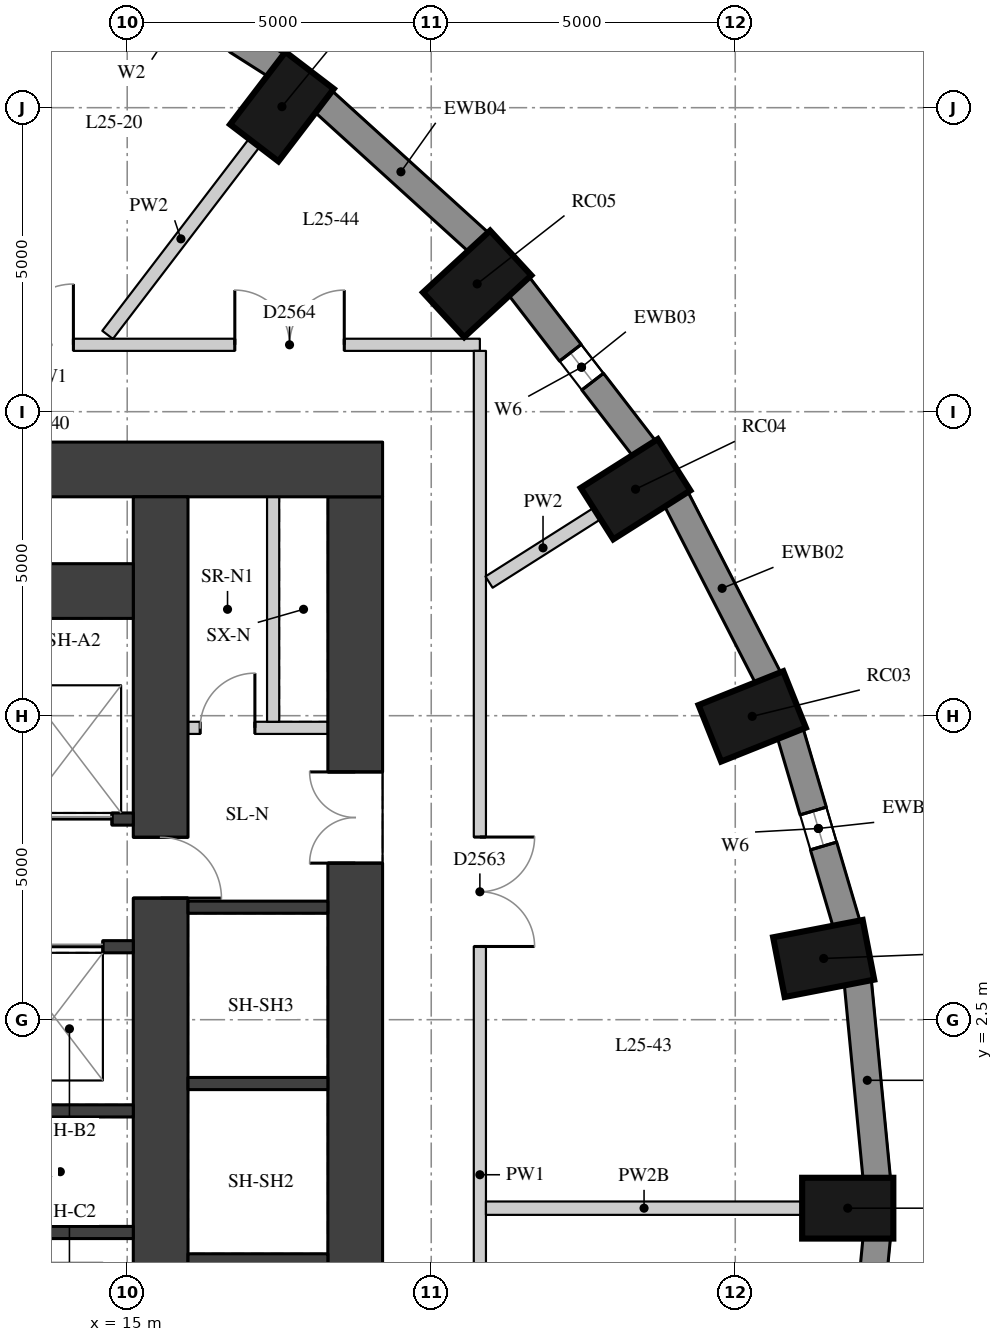
"""IFC4 building model, lengths in metres.
Left out: names, types, materials, properties, quantities, classifications, styles, units other than length and angle.
Written with IfcOpenShell. Run it as: python <this file> out.ifc"""

import sys

from ifc_helpers import new_model, si_unit, direction, frame, frame_2d, origin, origin_2d, place, context, subcontext, project, spatial, rectangle, extrude, element, fill, save


model = new_model("IFC4")
c1 = context("Model", 3, precision=1e-05, world=origin(), true_north=direction((0.0, 1.0)))
c2 = subcontext(c1, "Body", "Model", "MODEL_VIEW")
j1 = project(units=[si_unit("LENGTHUNIT", "METRE"), si_unit("PLANEANGLEUNIT", "RADIAN")], contexts=[c1])
p1 = place(None, origin())
s1 = spatial("IfcSite", under=j1, at=p1, CompositionType="ELEMENT")
p2 = place(p1, origin())
s2 = spatial("IfcBuilding", under=s1, at=p2, CompositionType="ELEMENT")
p3 = place(p2, frame((0.0, 0.0, 92.2)))
s3 = spatial("IfcBuildingStorey", under=s2, at=p3, CompositionType="ELEMENT", Elevation=92.2)
for number, where, z_axis, x_axis in (
    (1, (26.85, -0.6, 0.0), (0.0, 0.0, 1.0), (1.0, 0.0, 0.0)),
    (2, (26.454, 3.507, 0.0), (0.0, 0.0, 1.0), (0.982, 0.19, 0.0)),
    (3, (25.279, 7.489, 0.0), (0.0, 0.0, 1.0), (0.929, 0.371, 0.0)),
    (4, (23.36, 11.225, 0.0), (0.0, 0.0, 1.0), (0.845, 0.536, 0.0)),
    (5, (20.755, 14.602, 0.0), (0.0, 0.0, 1.0), (0.735, 0.678, 0.0)),
    (6, (17.545, 17.517, 0.0), (0.0, 0.0, 1.0), (0.607, 0.795, 0.0)),
):
    element("IfcColumn", number, at=place(p3, frame(where, z_axis=z_axis, x_axis=x_axis)), inside=s3, PredefinedType="COLUMN", context=c2, shape_type="SweptSolid", body=[
        extrude(rectangle(XDim=1.5, YDim=1.0, at=origin_2d()), origin(), (0.0, 0.0, 1.0), 3.3),
    ])
p4 = place(p3, frame((27.328, -0.12, 0.0), z_axis=(0.0, 0.0, 1.0), x_axis=(-0.09589355735, 0.995391594127, 0.0)))
e7 = element("IfcWall", 7, at=p4, inside=s3, PredefinedType="SOLIDWALL", context=c2, shape_type="SweptSolid", body=[
    extrude(rectangle(XDim=3.261, YDim=0.45, at=frame_2d((1.631, 0.0))), origin(), (0.0, 0.0, 1.0), 3.02),
])
p5 = place(p3, frame((26.832, 4.069, 0.0), z_axis=(0.0, 0.0, 1.0), x_axis=(-0.283002902729, 0.959119052593, 0.0)))
e8 = element("IfcWall", 8, at=p5, inside=s3, PredefinedType="SOLIDWALL", context=c2, shape_type="SweptSolid", body=[
    extrude(rectangle(XDim=3.286, YDim=0.45, at=frame_2d((1.643, 0.0))), origin(), (0.0, 0.0, 1.0), 3.02),
])
p6 = place(p5, frame((1.343, 0.0, 0.4)))
e9 = element("IfcOpeningElement", 9, at=p6, cuts=e8, PredefinedType="OPENING", context=c2, shape_type="SweptSolid", body=[
    extrude(rectangle(XDim=0.6, YDim=1.75, at=frame_2d((0.3, 0.875))), frame((0.0, 0.235, 0.0), z_axis=(0.0, -1.0, 0.0), x_axis=(1.0, 0.0, 0.0)), (0.0, 0.0, 1.0), 0.47),
])
p7 = place(p3, frame((25.545, 8.112, 0.0), z_axis=(0.0, 0.0, 1.0), x_axis=(-0.456828186229, 0.889554949549, 0.0)))
e10 = element("IfcWall", 10, at=p7, inside=s3, PredefinedType="SOLIDWALL", context=c2, shape_type="SweptSolid", body=[
    extrude(rectangle(XDim=3.333, YDim=0.45, at=frame_2d((1.667, 0.0))), origin(), (0.0, 0.0, 1.0), 3.02),
])
p8 = place(p3, frame((23.508, 11.887, 0.0), z_axis=(0.0, 0.0, 1.0), x_axis=(-0.610693945156, 0.791866721961, 0.0)))
e11 = element("IfcWall", 11, at=p8, inside=s3, PredefinedType="SOLIDWALL", context=c2, shape_type="SweptSolid", body=[
    extrude(rectangle(XDim=3.395, YDim=0.45, at=frame_2d((1.697, 0.0))), origin(), (0.0, 0.0, 1.0), 3.02),
])
p9 = place(p8, frame((1.397, 0.0, 0.4)))
e12 = element("IfcOpeningElement", 12, at=p9, cuts=e11, PredefinedType="OPENING", context=c2, shape_type="SweptSolid", body=[
    extrude(rectangle(XDim=0.6, YDim=1.75, at=frame_2d((0.3, 0.875))), frame((0.0, 0.235, 0.0), z_axis=(0.0, -1.0, 0.0), x_axis=(1.0, 0.0, 0.0)), (0.0, 0.0, 1.0), 0.47),
])
p10 = place(p3, frame((20.784, 15.281, 0.0), z_axis=(0.0, 0.0, 1.0), x_axis=(-0.74032902847, 0.672244694739, 0.0)))
e13 = element("IfcWall", 13, at=p10, inside=s3, PredefinedType="SOLIDWALL", context=c2, shape_type="SweptSolid", body=[
    extrude(rectangle(XDim=3.464, YDim=0.45, at=frame_2d((1.732, 0.0))), origin(), (0.0, 0.0, 1.0), 3.02),
])
p11 = place(p3, frame((17.456, 18.192, 0.0), z_axis=(0.0, 0.0, 1.0), x_axis=(-0.843880549131, 0.536531097699, 0.0)))
e14 = element("IfcWall", 14, at=p11, inside=s3, PredefinedType="SOLIDWALL", context=c2, shape_type="SweptSolid", body=[
    extrude(rectangle(XDim=3.532, YDim=0.45, at=frame_2d((1.766, 0.0))), origin(), (0.0, 0.0, 1.0), 3.02),
])
p12 = place(p11, frame((0.766, 0.0, 0.4)))
e15 = element("IfcOpeningElement", 15, at=p12, cuts=e14, PredefinedType="OPENING", context=c2, shape_type="SweptSolid", body=[
    extrude(rectangle(XDim=2.0, YDim=1.75, at=frame_2d((1.0, 0.875))), frame((0.0, 0.235, 0.0), z_axis=(0.0, -1.0, 0.0), x_axis=(1.0, 0.0, 0.0)), (0.0, 0.0, 1.0), 0.47),
])
p13 = place(p3, frame((27.015, -4.326, 0.0), z_axis=(0.0, 0.0, 1.0), x_axis=(0.09589355735, 0.995391594127, 0.0)))
e16 = element("IfcWall", 16, at=p13, inside=s3, PredefinedType="SOLIDWALL", context=c2, shape_type="SweptSolid", body=[
    extrude(rectangle(XDim=3.261, YDim=0.45, at=frame_2d((1.631, 0.0))), origin(), (0.0, 0.0, 1.0), 3.02),
])
p14 = place(p13, frame((1.331, 0.0, 0.4)))
e17 = element("IfcOpeningElement", 17, at=p14, cuts=e16, PredefinedType="OPENING", context=c2, shape_type="SweptSolid", body=[
    extrude(rectangle(XDim=0.6, YDim=1.75, at=frame_2d((0.3, 0.875))), frame((0.0, 0.235, 0.0), z_axis=(0.0, -1.0, 0.0), x_axis=(1.0, 0.0, 0.0)), (0.0, 0.0, 1.0), 0.47),
])
p15 = place(p3, frame((18.75, -11.1, 0.0), z_axis=(0.0, 0.0, 1.0), x_axis=(0.0, 1.0, 0.0)))
e18 = element("IfcWall", 18, at=p15, inside=s3, PredefinedType="SHEAR", context=c2, shape_type="SweptSolid", body=[
    extrude(rectangle(XDim=22.2, YDim=0.9, at=frame_2d((11.1, 0.0))), origin(), (0.0, 0.0, 1.0), 3.02),
])
p16 = place(p15, frame((16.175, 0.0, 0.0)))
e19 = element("IfcOpeningElement", 19, at=p16, cuts=e18, PredefinedType="OPENING", context=c2, shape_type="SweptSolid", body=[
    extrude(rectangle(XDim=1.5, YDim=2.1, at=frame_2d((0.75, 1.05))), frame((0.0, 0.46, 0.0), z_axis=(0.0, -1.0, 0.0), x_axis=(1.0, 0.0, 0.0)), (0.0, 0.0, 1.0), 0.92),
])
p17 = place(p15, frame((5.025, 0.0, 0.0)))
e20 = element("IfcOpeningElement", 20, at=p17, cuts=e18, PredefinedType="OPENING", context=c2, shape_type="SweptSolid", body=[
    extrude(rectangle(XDim=1.5, YDim=2.1, at=frame_2d((0.75, 1.05))), frame((0.0, 0.46, 0.0), z_axis=(0.0, -1.0, 0.0), x_axis=(1.0, 0.0, 0.0)), (0.0, 0.0, 1.0), 0.92),
])
p18 = place(p3, frame((4.0, 11.55, 0.0), z_axis=(0.0, 0.0, 1.0), x_axis=(1.0, 0.0, 0.0)))
e21 = element("IfcWall", 21, at=p18, inside=s3, PredefinedType="SHEAR", context=c2, shape_type="SweptSolid", body=[
    extrude(rectangle(XDim=15.2, YDim=0.9, at=frame_2d((7.6, 0.0))), origin(), (0.0, 0.0, 1.0), 3.02),
])
p19 = place(p3, frame((15.55, -11.1, 0.0), z_axis=(0.0, 0.0, 1.0), x_axis=(0.0, 1.0, 0.0)))
e22 = element("IfcWall", 22, at=p19, inside=s3, PredefinedType="SHEAR", context=c2, shape_type="SweptSolid", body=[
    extrude(rectangle(XDim=22.2, YDim=0.9, at=frame_2d((11.1, 0.0))), origin(), (0.0, 0.0, 1.0), 3.02),
])
p20 = place(p19, frame((15.6, 0.0, 0.0)))
e23 = element("IfcOpeningElement", 23, at=p20, cuts=e22, PredefinedType="OPENING", context=c2, shape_type="SweptSolid", body=[
    extrude(rectangle(XDim=1.0, YDim=2.1, at=frame_2d((0.5, 1.05))), frame((0.0, 0.46, 0.0), z_axis=(0.0, -1.0, 0.0), x_axis=(1.0, 0.0, 0.0)), (0.0, 0.0, 1.0), 0.92),
])
p21 = place(p19, frame((5.6, 0.0, 0.0)))
e24 = element("IfcOpeningElement", 24, at=p21, cuts=e22, PredefinedType="OPENING", context=c2, shape_type="SweptSolid", body=[
    extrude(rectangle(XDim=1.0, YDim=2.1, at=frame_2d((0.5, 1.05))), frame((0.0, 0.46, 0.0), z_axis=(0.0, -1.0, 0.0), x_axis=(1.0, 0.0, 0.0)), (0.0, 0.0, 1.0), 0.92),
])
p22 = place(p3, frame((4.9, 9.55, 0.0), z_axis=(0.0, 0.0, 1.0), x_axis=(1.0, 0.0, 0.0)))
e25 = element("IfcWall", 25, at=p22, inside=s3, PredefinedType="SHEAR", context=c2, shape_type="SweptSolid", body=[
    extrude(rectangle(XDim=10.2, YDim=0.9, at=frame_2d((5.1, 0.0))), origin(), (0.0, 0.0, 1.0), 3.02),
])
p23 = place(p3, frame((4.9, 5.8, 0.0), z_axis=(0.0, 0.0, 1.0), x_axis=(1.0, 0.0, 0.0)))
e26 = element("IfcWall", 26, at=p23, inside=s3, PredefinedType="SHEAR", context=c2, shape_type="SweptSolid", body=[
    extrude(rectangle(XDim=10.2, YDim=0.2, at=frame_2d((5.1, 0.0))), origin(), (0.0, 0.0, 1.0), 3.02),
])
p24 = place(p23, frame((6.75, 0.0, 0.0)))
e27 = element("IfcOpeningElement", 27, at=p24, cuts=e26, PredefinedType="OPENING", context=c2, shape_type="SweptSolid", body=[
    extrude(rectangle(XDim=1.1, YDim=2.1, at=frame_2d((0.55, 1.05))), frame((0.0, 0.11, 0.0), z_axis=(0.0, -1.0, 0.0), x_axis=(1.0, 0.0, 0.0)), (0.0, 0.0, 1.0), 0.22),
])
p25 = place(p23, frame((8.75, 0.0, 0.0)))
e28 = element("IfcOpeningElement", 28, at=p25, cuts=e26, PredefinedType="OPENING", context=c2, shape_type="SweptSolid", body=[
    extrude(rectangle(XDim=1.1, YDim=2.1, at=frame_2d((0.55, 1.05))), frame((0.0, 0.11, 0.0), z_axis=(0.0, -1.0, 0.0), x_axis=(1.0, 0.0, 0.0)), (0.0, 0.0, 1.0), 0.22),
])
p26 = place(p3, frame((4.9, 3.7, 0.0), z_axis=(0.0, 0.0, 1.0), x_axis=(1.0, 0.0, 0.0)))
e29 = element("IfcWall", 29, at=p26, inside=s3, PredefinedType="SHEAR", context=c2, shape_type="SweptSolid", body=[
    extrude(rectangle(XDim=10.2, YDim=0.2, at=frame_2d((5.1, 0.0))), origin(), (0.0, 0.0, 1.0), 3.02),
])
p27 = place(p26, frame((6.3, 0.0, 0.0)))
e30 = element("IfcOpeningElement", 30, at=p27, cuts=e29, PredefinedType="OPENING", context=c2, shape_type="SweptSolid", body=[
    extrude(rectangle(XDim=1.1, YDim=2.1, at=frame_2d((0.55, 1.05))), frame((0.0, 0.11, 0.0), z_axis=(0.0, -1.0, 0.0), x_axis=(1.0, 0.0, 0.0)), (0.0, 0.0, 1.0), 0.22),
])
p28 = place(p26, frame((8.6, 0.0, 0.0)))
e31 = element("IfcOpeningElement", 31, at=p28, cuts=e29, PredefinedType="OPENING", context=c2, shape_type="SweptSolid", body=[
    extrude(rectangle(XDim=1.1, YDim=2.1, at=frame_2d((0.55, 1.05))), frame((0.0, 0.11, 0.0), z_axis=(0.0, -1.0, 0.0), x_axis=(1.0, 0.0, 0.0)), (0.0, 0.0, 1.0), 0.22),
])
for number, where, z_axis, x_axis in (
    (32, (4.9, 1.0, 0.0), (0.0, 0.0, 1.0), (1.0, 0.0, 0.0)),
    (33, (4.9, -1.0, 0.0), (0.0, 0.0, 1.0), (1.0, 0.0, 0.0)),
):
    element("IfcWall", number, at=place(p3, frame(where, z_axis=z_axis, x_axis=x_axis)), inside=s3, PredefinedType="SHEAR", context=c2, shape_type="SweptSolid", body=[
        extrude(rectangle(XDim=10.2, YDim=0.2, at=frame_2d((5.1, 0.0))), origin(), (0.0, 0.0, 1.0), 3.02),
    ])
for number, where, z_axis, x_axis in (
    (34, (16.0, -1.45, 0.0), (0.0, 0.0, 1.0), (1.0, 0.0, 0.0)),
    (35, (16.0, 1.45, 0.0), (0.0, 0.0, 1.0), (1.0, 0.0, 0.0)),
    (36, (16.0, 4.35, 0.0), (0.0, 0.0, 1.0), (1.0, 0.0, 0.0)),
):
    element("IfcWall", number, at=place(p3, frame(where, z_axis=z_axis, x_axis=x_axis)), inside=s3, PredefinedType="SHEAR", context=c2, shape_type="SweptSolid", body=[
        extrude(rectangle(XDim=2.3, YDim=0.2, at=frame_2d((1.15, 0.0))), origin(), (0.0, 0.0, 1.0), 3.02),
    ])
p29 = place(p3, frame((16.0, 7.3, 0.0), z_axis=(0.0, 0.0, 1.0), x_axis=(1.0, 0.0, 0.0)))
e37 = element("IfcWall", 37, at=p29, inside=s3, PredefinedType="PARTITIONING", context=c2, shape_type="SweptSolid", body=[
    extrude(rectangle(XDim=2.3, YDim=0.2, at=frame_2d((1.15, 0.0))), origin(), (0.0, 0.0, 1.0), 3.02),
])
p30 = place(p29, frame((0.2, 0.0, 0.0)))
e38 = element("IfcOpeningElement", 38, at=p30, cuts=e37, PredefinedType="OPENING", context=c2, shape_type="SweptSolid", body=[
    extrude(rectangle(XDim=0.9, YDim=2.1, at=frame_2d((0.45, 1.05))), frame((0.0, 0.11, 0.0), z_axis=(0.0, -1.0, 0.0), x_axis=(1.0, 0.0, 0.0)), (0.0, 0.0, 1.0), 0.22),
])
p31 = place(p3, frame((17.4, 7.4, 0.0), z_axis=(0.0, 0.0, 1.0), x_axis=(0.0, 1.0, 0.0)))
e39 = element("IfcWall", 39, at=p31, inside=s3, PredefinedType="PARTITIONING", context=c2, shape_type="SweptSolid", body=[
    extrude(rectangle(XDim=3.7, YDim=0.2, at=frame_2d((1.85, 0.0))), origin(), (0.0, 0.0, 1.0), 3.02),
])
p32 = place(p3, frame((6.589, 13.6, 0.0), z_axis=(0.0, 0.0, 1.0), x_axis=(1.0, 0.0, 0.0)))
e40 = element("IfcWall", 40, at=p32, inside=s3, PredefinedType="PARTITIONING", context=c2, shape_type="SweptSolid", body=[
    extrude(rectangle(XDim=14.211, YDim=0.2, at=frame_2d((7.106, 0.0))), origin(), (0.0, 0.0, 1.0), 3.02),
])
p33 = place(p32, frame((6.527, 0.0, 0.0)))
e41 = element("IfcOpeningElement", 41, at=p33, cuts=e40, PredefinedType="OPENING", context=c2, shape_type="SweptSolid", body=[
    extrude(rectangle(XDim=1.0, YDim=2.1, at=frame_2d((0.5, 1.05))), frame((0.0, 0.11, 0.0), z_axis=(0.0, -1.0, 0.0), x_axis=(1.0, 0.0, 0.0)), (0.0, 0.0, 1.0), 0.22),
])
p34 = place(p32, frame((0.423, 0.0, 0.0)))
e42 = element("IfcOpeningElement", 42, at=p34, cuts=e40, PredefinedType="OPENING", context=c2, shape_type="SweptSolid", body=[
    extrude(rectangle(XDim=1.1, YDim=2.1, at=frame_2d((0.55, 1.05))), frame((0.0, 0.11, 0.0), z_axis=(0.0, -1.0, 0.0), x_axis=(1.0, 0.0, 0.0)), (0.0, 0.0, 1.0), 0.22),
])
p35 = place(p32, frame((10.181, 0.0, 0.0)))
e43 = element("IfcOpeningElement", 43, at=p35, cuts=e40, PredefinedType="OPENING", context=c2, shape_type="SweptSolid", body=[
    extrude(rectangle(XDim=1.8, YDim=2.1, at=frame_2d((0.9, 1.05))), frame((0.0, 0.11, 0.0), z_axis=(0.0, -1.0, 0.0), x_axis=(1.0, 0.0, 0.0)), (0.0, 0.0, 1.0), 0.22),
])
p36 = place(p3, frame((20.8, 13.5, 0.0), z_axis=(0.0, 0.0, 1.0), x_axis=(0.0, -1.0, 0.0)))
e44 = element("IfcWall", 44, at=p36, inside=s3, PredefinedType="PARTITIONING", context=c2, shape_type="SweptSolid", body=[
    extrude(rectangle(XDim=27.1, YDim=0.2, at=frame_2d((13.55, 0.0))), origin(), (0.0, 0.0, 1.0), 3.02),
])
p37 = place(p36, frame((22.844, 0.0, 0.0)))
e45 = element("IfcOpeningElement", 45, at=p37, cuts=e44, PredefinedType="OPENING", context=c2, shape_type="SweptSolid", body=[
    extrude(rectangle(XDim=1.8, YDim=2.1, at=frame_2d((0.9, 1.05))), frame((0.0, 0.11, 0.0), z_axis=(0.0, -1.0, 0.0), x_axis=(1.0, 0.0, 0.0)), (0.0, 0.0, 1.0), 0.22),
])
p38 = place(p36, frame((16.35, 0.0, 0.0)))
e46 = element("IfcOpeningElement", 46, at=p38, cuts=e44, PredefinedType="OPENING", context=c2, shape_type="SweptSolid", body=[
    extrude(rectangle(XDim=1.8, YDim=2.1, at=frame_2d((0.9, 1.05))), frame((0.0, 0.11, 0.0), z_axis=(0.0, -1.0, 0.0), x_axis=(1.0, 0.0, 0.0)), (0.0, 0.0, 1.0), 0.22),
])
p39 = place(p36, frame((7.996, 0.0, 0.0)))
e47 = element("IfcOpeningElement", 47, at=p39, cuts=e44, PredefinedType="OPENING", context=c2, shape_type="SweptSolid", body=[
    extrude(rectangle(XDim=1.8, YDim=2.1, at=frame_2d((0.9, 1.05))), frame((0.0, 0.11, 0.0), z_axis=(0.0, -1.0, 0.0), x_axis=(1.0, 0.0, 0.0)), (0.0, 0.0, 1.0), 0.22),
])
p40 = place(p3, frame((26.1, -0.6, 0.0), z_axis=(0.0, 0.0, 1.0), x_axis=(-1.0, 0.0, 0.0)))
e48 = element("IfcWall", 48, at=p40, inside=s3, PredefinedType="PARTITIONING", context=c2, shape_type="SweptSolid", body=[
    extrude(rectangle(XDim=5.2, YDim=0.22, at=frame_2d((2.6, 0.0))), origin(), (0.0, 0.0, 1.0), 2.57),
])
p41 = place(p3, frame((22.727, 10.823, 0.0), z_axis=(0.0, 0.0, 1.0), x_axis=(-0.844549560094, -0.53547739499, 0.0)))
e49 = element("IfcWall", 49, at=p41, inside=s3, PredefinedType="PARTITIONING", context=c2, shape_type="SweptSolid", body=[
    extrude(rectangle(XDim=2.103, YDim=0.22, at=frame_2d((1.051, 0.0))), origin(), (0.0, 0.0, 1.0), 3.02),
])
p42 = place(p3, frame((17.089, 16.921, 0.0), z_axis=(0.0, 0.0, 1.0), x_axis=(-0.607055443677, -0.794659479464, 0.0)))
e50 = element("IfcWall", 50, at=p42, inside=s3, PredefinedType="PARTITIONING", context=c2, shape_type="SweptSolid", body=[
    extrude(rectangle(XDim=3.973, YDim=0.22, at=frame_2d((1.987, 0.0))), origin(), (0.0, 0.0, 1.0), 3.02),
])
p43 = place(p6, origin())
e51 = element("IfcWindow", 51, at=p43, inside=s3, PartitioningType="SINGLE_PANEL", PredefinedType="WINDOW", context=c2, shape_type="SweptSolid", body=[
    extrude(rectangle(XDim=0.6, YDim=1.75, at=frame_2d((0.3, 0.875))), frame((0.0, 0.035, 0.0), z_axis=(0.0, -1.0, 0.0), x_axis=(1.0, 0.0, 0.0)), (0.0, 0.0, 1.0), 0.06),
])
fill(e9, e51)
p44 = place(p9, origin())
e52 = element("IfcWindow", 52, at=p44, inside=s3, PartitioningType="SINGLE_PANEL", PredefinedType="WINDOW", context=c2, shape_type="SweptSolid", body=[
    extrude(rectangle(XDim=0.6, YDim=1.75, at=frame_2d((0.3, 0.875))), frame((0.0, 0.035, 0.0), z_axis=(0.0, -1.0, 0.0), x_axis=(1.0, 0.0, 0.0)), (0.0, 0.0, 1.0), 0.06),
])
fill(e12, e52)
p45 = place(p16, origin())
e53 = element("IfcDoor", 53, at=p45, inside=s3, OperationType="DOUBLE_DOOR_SINGLE_SWING", PredefinedType="DOOR", context=c2, shape_type="SweptSolid", body=[
    extrude(rectangle(XDim=1.5, YDim=2.1, at=frame_2d((0.75, 1.05))), frame((0.0, 0.025, 0.0), z_axis=(0.0, -1.0, 0.0), x_axis=(1.0, 0.0, 0.0)), (0.0, 0.0, 1.0), 0.05),
])
fill(e19, e53)
p46 = place(p25, origin())
e54 = element("IfcDoor", 54, at=p46, inside=s3, OperationType="DOUBLE_DOOR_SLIDING", PredefinedType="DOOR", context=c2, shape_type="SweptSolid", body=[
    extrude(rectangle(XDim=1.1, YDim=2.1, at=frame_2d((0.55, 1.05))), frame((0.0, 0.025, 0.0), z_axis=(0.0, -1.0, 0.0), x_axis=(1.0, 0.0, 0.0)), (0.0, 0.0, 1.0), 0.05),
])
fill(e28, e54)
p47 = place(p28, origin())
e55 = element("IfcDoor", 55, at=p47, inside=s3, OperationType="DOUBLE_DOOR_SLIDING", PredefinedType="DOOR", context=c2, shape_type="SweptSolid", body=[
    extrude(rectangle(XDim=1.1, YDim=2.1, at=frame_2d((0.55, 1.05))), frame((0.0, 0.025, 0.0), z_axis=(0.0, -1.0, 0.0), x_axis=(1.0, 0.0, 0.0)), (0.0, 0.0, 1.0), 0.05),
])
fill(e31, e55)
p48 = place(p20, origin())
e56 = element("IfcDoor", 56, at=p48, inside=s3, OperationType="SINGLE_SWING_RIGHT", PredefinedType="DOOR", context=c2, shape_type="SweptSolid", body=[
    extrude(rectangle(XDim=1.0, YDim=2.1, at=frame_2d((0.5, 1.05))), frame((0.0, 0.025, 0.0), z_axis=(0.0, -1.0, 0.0), x_axis=(1.0, 0.0, 0.0)), (0.0, 0.0, 1.0), 0.05),
])
fill(e23, e56)
p49 = place(p30, origin())
e57 = element("IfcDoor", 57, at=p49, inside=s3, OperationType="SINGLE_SWING_RIGHT", PredefinedType="DOOR", context=c2, shape_type="SweptSolid", body=[
    extrude(rectangle(XDim=0.9, YDim=2.1, at=frame_2d((0.45, 1.05))), frame((0.0, 0.025, 0.0), z_axis=(0.0, -1.0, 0.0), x_axis=(1.0, 0.0, 0.0)), (0.0, 0.0, 1.0), 0.05),
])
fill(e38, e57)
p50 = place(p33, origin())
e58 = element("IfcDoor", 58, at=p50, inside=s3, OperationType="SINGLE_SWING_RIGHT", PredefinedType="DOOR", context=c2, shape_type="SweptSolid", body=[
    extrude(rectangle(XDim=1.0, YDim=2.1, at=frame_2d((0.5, 1.05))), frame((0.0, 0.025, 0.0), z_axis=(0.0, -1.0, 0.0), x_axis=(1.0, 0.0, 0.0)), (0.0, 0.0, 1.0), 0.05),
])
fill(e41, e58)
p51 = place(p39, origin())
e59 = element("IfcDoor", 59, at=p51, inside=s3, OperationType="DOUBLE_DOOR_SINGLE_SWING", PredefinedType="DOOR", context=c2, shape_type="SweptSolid", body=[
    extrude(rectangle(XDim=1.8, YDim=2.1, at=frame_2d((0.9, 1.05))), frame((0.0, 0.025, 0.0), z_axis=(0.0, -1.0, 0.0), x_axis=(1.0, 0.0, 0.0)), (0.0, 0.0, 1.0), 0.05),
])
fill(e47, e59)
p52 = place(p35, origin())
e60 = element("IfcDoor", 60, at=p52, inside=s3, OperationType="DOUBLE_DOOR_SINGLE_SWING", PredefinedType="DOOR", context=c2, shape_type="SweptSolid", body=[
    extrude(rectangle(XDim=1.8, YDim=2.1, at=frame_2d((0.9, 1.05))), frame((0.0, 0.025, 0.0), z_axis=(0.0, -1.0, 0.0), x_axis=(1.0, 0.0, 0.0)), (0.0, 0.0, 1.0), 0.05),
])
fill(e43, e60)
save(model, sys.argv[1])
